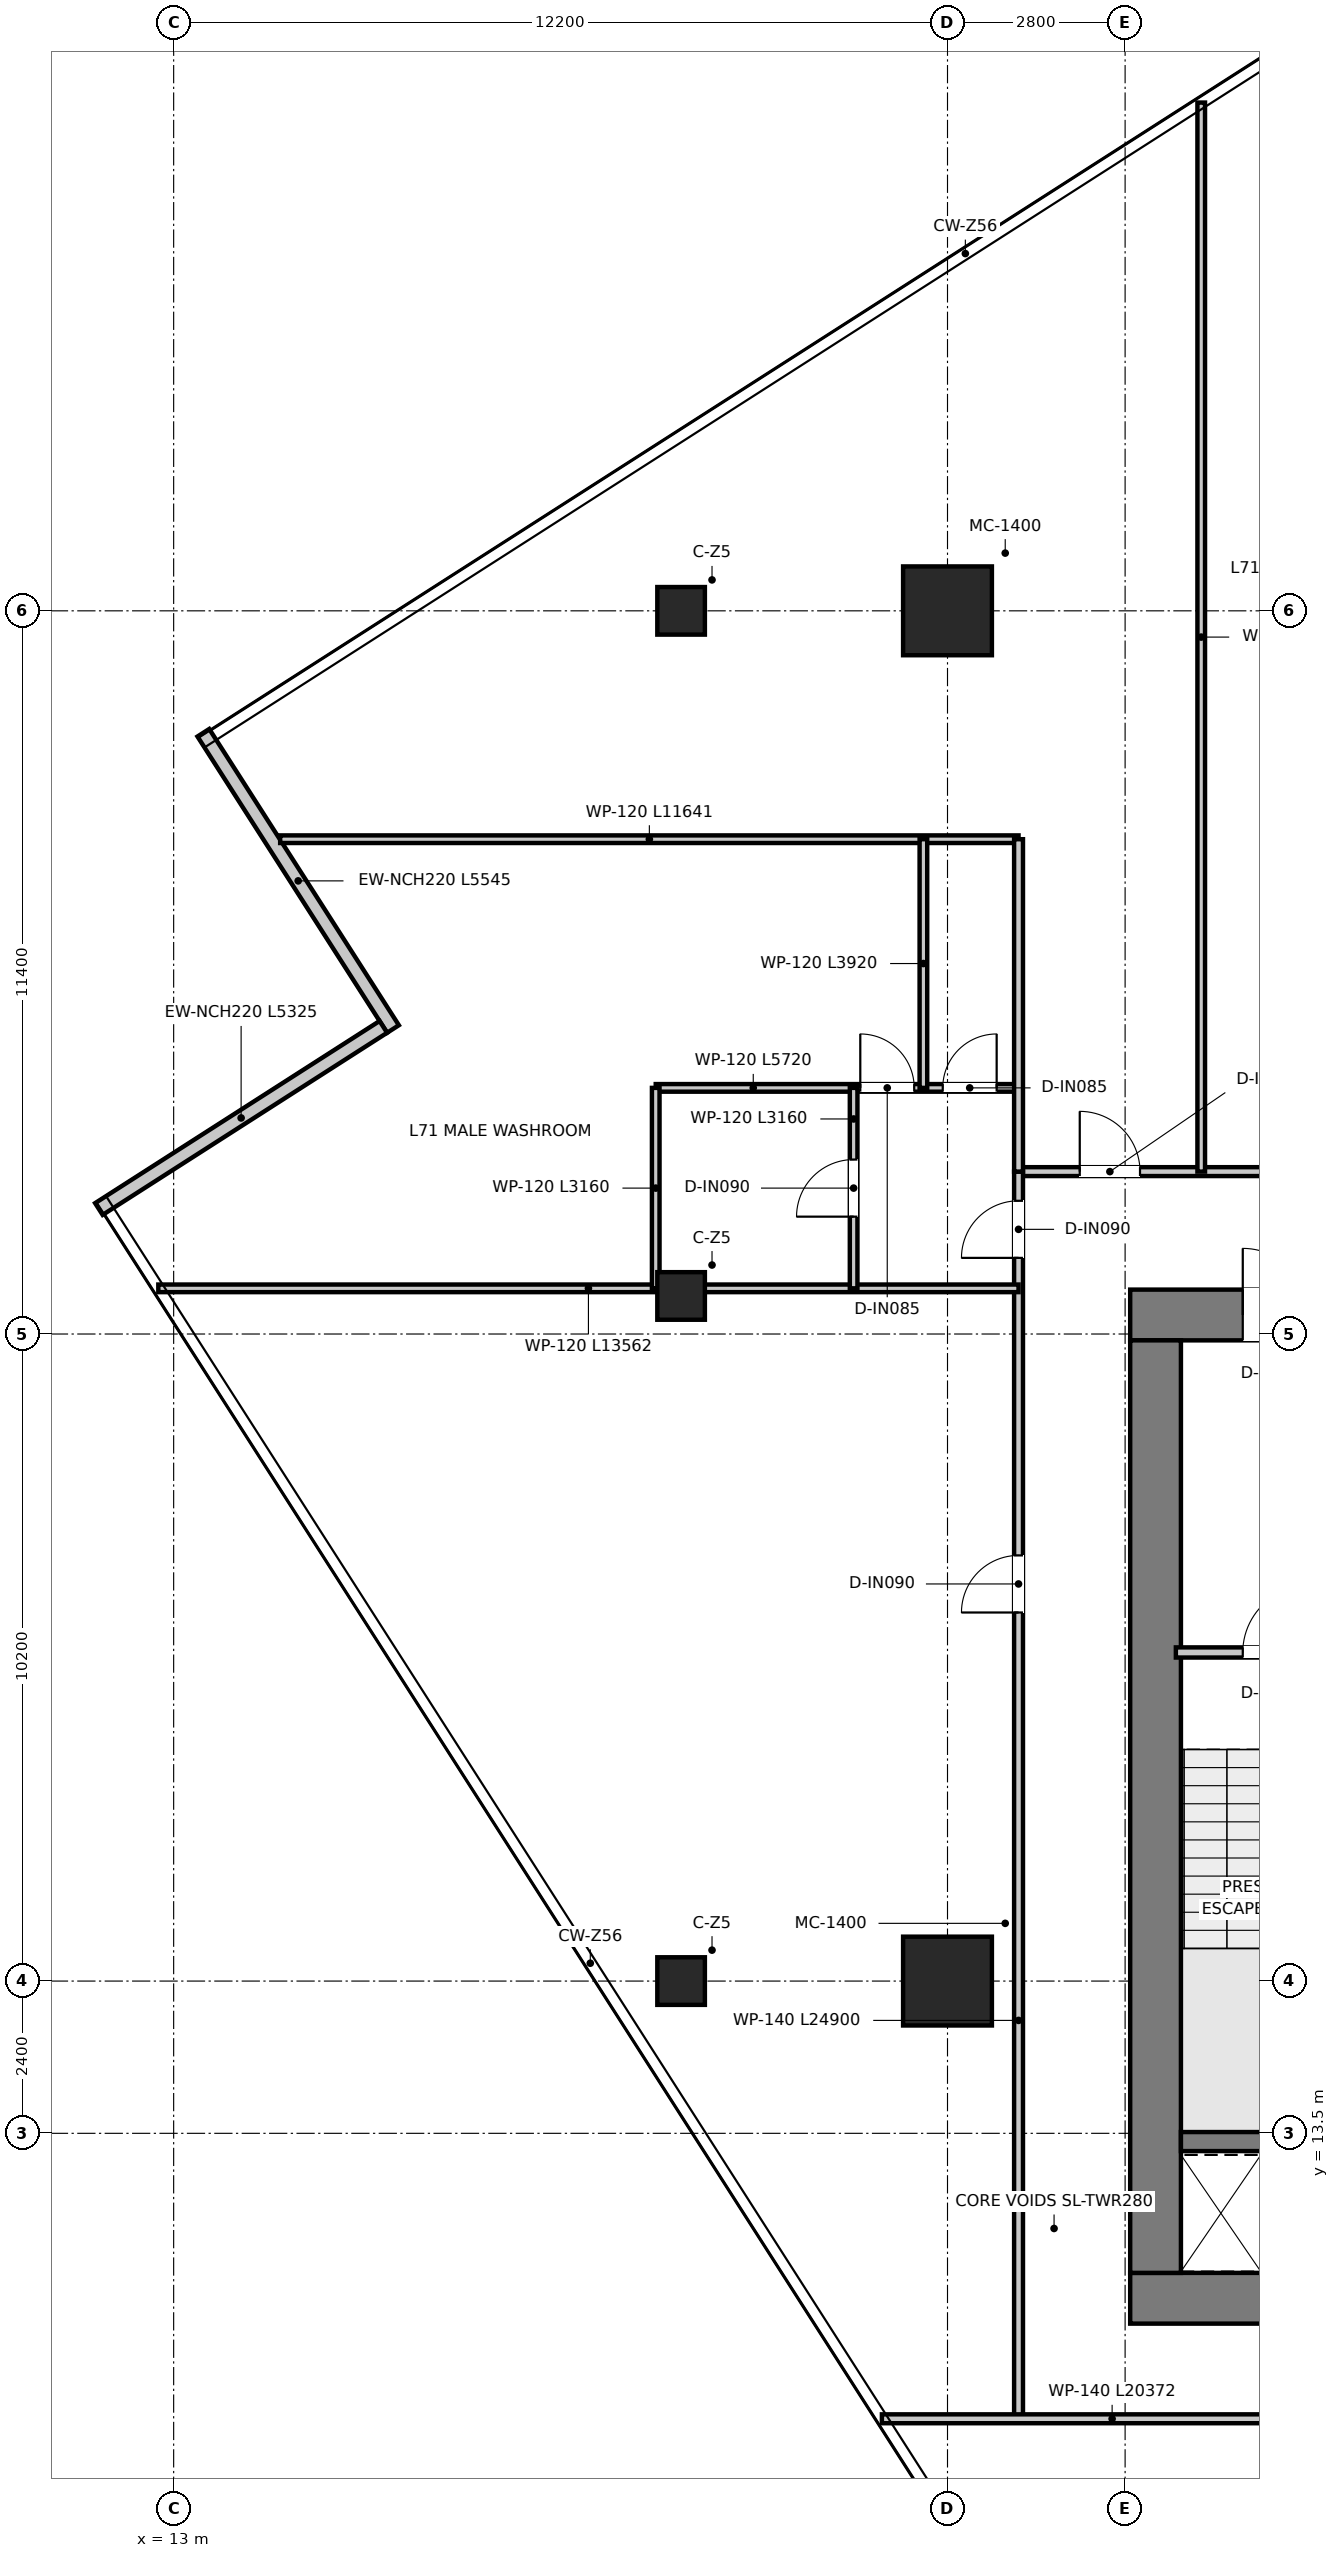
"""IFC4 building model, lengths in metres.
Left out: names, types, materials, properties, quantities, classifications, styles, units other than length and angle.
Written with IfcOpenShell. Run it as: python <this file> out.ifc"""

import sys

from ifc_helpers import new_model, si_unit, direction, frame, frame_2d, origin, origin_2d, place, context, subcontext, project, spatial, rectangle, extrude, source, transform, mapped, element, fill, save


model = new_model("IFC4")
c1 = context("Model", 3, precision=1e-05, world=origin(), true_north=direction((0.0, 1.0)))
c2 = subcontext(c1, "Body", "Model", "MODEL_VIEW")
j1 = project(units=[si_unit("LENGTHUNIT", "METRE"), si_unit("PLANEANGLEUNIT", "RADIAN")], contexts=[c1])
p1 = place(None, origin())
s1 = spatial("IfcSite", under=j1, at=p1, CompositionType="ELEMENT")
p2 = place(p1, origin())
s2 = spatial("IfcBuilding", under=s1, at=p2, CompositionType="ELEMENT")
p3 = place(p2, frame((0.0, 0.0, 291.1)))
s3 = spatial("IfcBuildingStorey", under=s2, at=p3, CompositionType="ELEMENT", Elevation=291.1)
p4 = place(p3, frame((28.08, 10.9, 0.0), z_axis=(0.0, 0.0, 1.0), x_axis=(1.0, 0.0, 0.0)))
e1 = element("IfcWall", 1, at=p4, inside=s3, PredefinedType="SHEAR", context=c2, shape_type="SweptSolid", body=[
    extrude(rectangle(XDim=15.84, YDim=0.8, at=frame_2d((7.92, 0.0))), origin(), (0.0, 0.0, 1.0), 3.95),
])
p5 = place(p3, frame((28.08, 26.4, 0.0), z_axis=(0.0, 0.0, 1.0), x_axis=(1.0, 0.0, 0.0)))
e2 = element("IfcWall", 2, at=p5, inside=s3, PredefinedType="SHEAR", context=c2, shape_type="SweptSolid", body=[
    extrude(rectangle(XDim=15.84, YDim=0.8, at=frame_2d((7.92, 0.0))), origin(), (0.0, 0.0, 1.0), 3.95),
])
p6 = place(p5, frame((7.22, 0.0, 0.0)))
e3 = element("IfcOpeningElement", 3, at=p6, cuts=e2, PredefinedType="OPENING", context=c2, shape_type="SweptSolid", body=[
    extrude(rectangle(XDim=1.4, YDim=2.2, at=frame_2d((0.7, 1.1))), frame((0.0, 0.41, 0.0), z_axis=(0.0, -1.0, 0.0), x_axis=(1.0, 0.0, 0.0)), (0.0, 0.0, 1.0), 0.82),
])
p7 = place(p5, frame((1.775, 0.0, 0.0)))
e4 = element("IfcOpeningElement", 4, at=p7, cuts=e2, PredefinedType="OPENING", context=c2, shape_type="SweptSolid", body=[
    extrude(rectangle(XDim=1.05, YDim=2.1, at=frame_2d((0.525, 1.05))), frame((0.0, 0.41, 0.0), z_axis=(0.0, -1.0, 0.0), x_axis=(1.0, 0.0, 0.0)), (0.0, 0.0, 1.0), 0.82),
])
p8 = place(p5, frame((13.015, 0.0, 0.0)))
e5 = element("IfcOpeningElement", 5, at=p8, cuts=e2, PredefinedType="OPENING", context=c2, shape_type="SweptSolid", body=[
    extrude(rectangle(XDim=1.05, YDim=2.1, at=frame_2d((0.525, 1.05))), frame((0.0, 0.41, 0.0), z_axis=(0.0, -1.0, 0.0), x_axis=(1.0, 0.0, 0.0)), (0.0, 0.0, 1.0), 0.82),
])
p9 = place(p3, frame((28.48, 11.3, 0.0), z_axis=(0.0, 0.0, 1.0), x_axis=(0.0, 1.0, 0.0)))
e6 = element("IfcWall", 6, at=p9, inside=s3, PredefinedType="SHEAR", context=c2, shape_type="SweptSolid", body=[
    extrude(rectangle(XDim=14.7, YDim=0.8, at=frame_2d((7.35, 0.0))), origin(), (0.0, 0.0, 1.0), 3.95),
])
p10 = place(p3, frame((28.88, 13.37, 0.0), z_axis=(0.0, 0.0, 1.0), x_axis=(1.0, 0.0, 0.0)))
e7 = element("IfcWall", 7, at=p10, inside=s3, PredefinedType="SHEAR", context=c2, shape_type="SweptSolid", body=[
    extrude(rectangle(XDim=3.1, YDim=0.3, at=frame_2d((1.55, 0.0))), origin(), (0.0, 0.0, 1.0), 3.95),
])
m1 = source(origin(), c2, "Body", "SweptSolid", [
    extrude(rectangle(XDim=1.4, YDim=1.4, at=origin_2d()), origin(), (0.0, 0.0, 1.0), 3.95),
])
for number, where, z_axis, x_axis in (
    (8, (25.2, 15.9, 0.0), (0.0, 0.0, 1.0), (1.0, 0.0, 0.0)),
    (9, (25.2, 37.5, 0.0), (0.0, 0.0, 1.0), (1.0, 0.0, 0.0)),
):
    element("IfcColumn", number, at=place(p3, frame(where, z_axis=z_axis, x_axis=x_axis)), inside=s3, PredefinedType="USERDEFINED", context=c2, shape_type="MappedRepresentation", body=[
        mapped(m1, transform((0.0, 0.0, 0.0), x_axis=(1.0, 0.0, 0.0), y_axis=(0.0, 1.0, 0.0), z_axis=(0.0, 0.0, 1.0), scale=1.0)),
    ])
m2 = source(origin(), c2, "Body", "SweptSolid", [
    extrude(rectangle(XDim=0.75, YDim=0.75, at=origin_2d()), origin(), (0.0, 0.0, 1.0), 3.95),
])
for number, where, z_axis, x_axis in (
    (10, (21.0, 15.9, 0.0), (0.0, 0.0, 1.0), (1.0, 0.0, 0.0)),
    (11, (21.0, 26.7, 0.0), (0.0, 0.0, 1.0), (1.0, 0.0, 0.0)),
    (12, (21.0, 37.5, 0.0), (0.0, 0.0, 1.0), (1.0, 0.0, 0.0)),
):
    element("IfcColumn", number, at=place(p3, frame(where, z_axis=z_axis, x_axis=x_axis)), inside=s3, PredefinedType="COLUMN", context=c2, shape_type="MappedRepresentation", body=[
        mapped(m2, transform((0.0, 0.0, 0.0), x_axis=(1.0, 0.0, 0.0), y_axis=(0.0, 1.0, 0.0), z_axis=(0.0, 0.0, 1.0), scale=1.0)),
    ])
p11 = place(p3, frame((13.468, 35.578, 0.0), z_axis=(0.0, 0.0, 1.0), x_axis=(0.539129907131, -0.842222620948, 0.0)))
e13 = element("IfcWall", 13, at=p11, inside=s3, PredefinedType="ELEMENTEDWALL", context=c2, shape_type="SweptSolid", body=[
    extrude(rectangle(XDim=5.545, YDim=0.22, at=frame_2d((2.772, 0.0))), origin(), (0.0, 0.0, 1.0), 3.67),
])
p12 = place(p3, frame((16.306, 30.941, 0.0), z_axis=(0.0, 0.0, 1.0), x_axis=(-0.84222560178, -0.539125250481, 0.0)))
e14 = element("IfcWall", 14, at=p12, inside=s3, PredefinedType="ELEMENTEDWALL", context=c2, shape_type="SweptSolid", body=[
    extrude(rectangle(XDim=5.325, YDim=0.22, at=frame_2d((2.663, 0.0))), origin(), (0.0, 0.0, 1.0), 3.67),
])
p13 = place(p3, frame((28.8, 21.08, 0.0), z_axis=(0.0, 0.0, 1.0), x_axis=(1.0, 0.0, 0.0)))
e15 = element("IfcWall", 15, at=p13, inside=s3, PredefinedType="PARTITIONING", context=c2, shape_type="SweptSolid", body=[
    extrude(rectangle(XDim=3.16, YDim=0.16, at=frame_2d((1.58, 0.0))), origin(), (0.0, 0.0, 1.0), 3.67),
])
p14 = place(p13, frame((1.055, 0.0, 0.0)))
e16 = element("IfcOpeningElement", 16, at=p14, cuts=e15, PredefinedType="OPENING", context=c2, shape_type="SweptSolid", body=[
    extrude(rectangle(XDim=1.05, YDim=2.1, at=frame_2d((0.525, 1.05))), frame((0.0, 0.09, 0.0), z_axis=(0.0, -1.0, 0.0), x_axis=(1.0, 0.0, 0.0)), (0.0, 0.0, 1.0), 0.18),
])
p15 = place(p3, frame((26.32, 28.66, 0.0), z_axis=(0.0, 0.0, 1.0), x_axis=(1.0, 0.0, 0.0)))
e17 = element("IfcWall", 17, at=p15, inside=s3, PredefinedType="PARTITIONING", context=c2, shape_type="SweptSolid", body=[
    extrude(rectangle(XDim=19.36, YDim=0.14, at=frame_2d((9.68, 0.0))), origin(), (0.0, 0.0, 1.0), 3.18),
])
p16 = place(p15, frame((0.965, 0.0, 0.0)))
e18 = element("IfcOpeningElement", 18, at=p16, cuts=e17, PredefinedType="OPENING", context=c2, shape_type="SweptSolid", body=[
    extrude(rectangle(XDim=0.95, YDim=2.1, at=frame_2d((0.475, 1.05))), frame((0.0, 0.08, 0.0), z_axis=(0.0, -1.0, 0.0), x_axis=(1.0, 0.0, 0.0)), (0.0, 0.0, 1.0), 0.16),
])
p17 = place(p15, frame((4.705, 0.0, 0.0)))
e19 = element("IfcOpeningElement", 19, at=p17, cuts=e17, PredefinedType="OPENING", context=c2, shape_type="SweptSolid", body=[
    extrude(rectangle(XDim=0.95, YDim=2.1, at=frame_2d((0.475, 1.05))), frame((0.0, 0.08, 0.0), z_axis=(0.0, -1.0, 0.0), x_axis=(1.0, 0.0, 0.0)), (0.0, 0.0, 1.0), 0.16),
])
p18 = place(p15, frame((9.305, 0.0, 0.0)))
e20 = element("IfcOpeningElement", 20, at=p18, cuts=e17, PredefinedType="OPENING", context=c2, shape_type="SweptSolid", body=[
    extrude(rectangle(XDim=0.95, YDim=2.1, at=frame_2d((0.475, 1.05))), frame((0.0, 0.08, 0.0), z_axis=(0.0, -1.0, 0.0), x_axis=(1.0, 0.0, 0.0)), (0.0, 0.0, 1.0), 0.16),
])
p19 = place(p15, frame((13.805, 0.0, 0.0)))
e21 = element("IfcOpeningElement", 21, at=p19, cuts=e17, PredefinedType="OPENING", context=c2, shape_type="SweptSolid", body=[
    extrude(rectangle(XDim=0.95, YDim=2.1, at=frame_2d((0.475, 1.05))), frame((0.0, 0.08, 0.0), z_axis=(0.0, -1.0, 0.0), x_axis=(1.0, 0.0, 0.0)), (0.0, 0.0, 1.0), 0.16),
])
p20 = place(p15, frame((17.445, 0.0, 0.0)))
e22 = element("IfcOpeningElement", 22, at=p20, cuts=e17, PredefinedType="OPENING", context=c2, shape_type="SweptSolid", body=[
    extrude(rectangle(XDim=0.95, YDim=2.1, at=frame_2d((0.475, 1.05))), frame((0.0, 0.08, 0.0), z_axis=(0.0, -1.0, 0.0), x_axis=(1.0, 0.0, 0.0)), (0.0, 0.0, 1.0), 0.16),
])
p21 = place(p3, frame((26.32, 9.0, 0.0), z_axis=(0.0, 0.0, 1.0), x_axis=(0.0, 1.0, 0.0)))
e23 = element("IfcWall", 23, at=p21, inside=s3, PredefinedType="PARTITIONING", context=c2, shape_type="SweptSolid", body=[
    extrude(rectangle(XDim=19.66, YDim=0.14, at=frame_2d((9.83, 0.0))), origin(), (0.0, 0.0, 1.0), 3.13),
])
p22 = place(p21, frame((18.3, 0.0, 0.0)))
e24 = element("IfcOpeningElement", 24, at=p22, cuts=e23, PredefinedType="OPENING", context=c2, shape_type="SweptSolid", body=[
    extrude(rectangle(XDim=0.9, YDim=2.1, at=frame_2d((0.45, 1.05))), frame((0.0, 0.08, 0.0), z_axis=(0.0, -1.0, 0.0), x_axis=(1.0, 0.0, 0.0)), (0.0, 0.0, 1.0), 0.16),
])
p23 = place(p21, frame((12.71, 0.0, 0.0)))
e25 = element("IfcOpeningElement", 25, at=p23, cuts=e23, PredefinedType="OPENING", context=c2, shape_type="SweptSolid", body=[
    extrude(rectangle(XDim=0.9, YDim=2.1, at=frame_2d((0.45, 1.05))), frame((0.0, 0.08, 0.0), z_axis=(0.0, -1.0, 0.0), x_axis=(1.0, 0.0, 0.0)), (0.0, 0.0, 1.0), 0.16),
])
p24 = place(p3, frame((24.166, 9.0, 0.0), z_axis=(0.0, 0.0, 1.0), x_axis=(1.0, 0.0, 0.0)))
e26 = element("IfcWall", 26, at=p24, inside=s3, PredefinedType="PARTITIONING", context=c2, shape_type="SweptSolid", body=[
    extrude(rectangle(XDim=20.372, YDim=0.14, at=frame_2d((10.186, 0.0))), origin(), (0.0, 0.0, 1.0), 3.67),
])
p25 = place(p24, frame((7.409, 0.0, 0.0)))
e27 = element("IfcOpeningElement", 27, at=p25, cuts=e26, PredefinedType="OPENING", context=c2, shape_type="SweptSolid", body=[
    extrude(rectangle(XDim=0.85, YDim=2.1, at=frame_2d((0.425, 1.05))), frame((0.0, 0.08, 0.0), z_axis=(0.0, -1.0, 0.0), x_axis=(1.0, 0.0, 0.0)), (0.0, 0.0, 1.0), 0.16),
])
p26 = place(p24, frame((15.409, 0.0, 0.0)))
e28 = element("IfcOpeningElement", 28, at=p26, cuts=e26, PredefinedType="OPENING", context=c2, shape_type="SweptSolid", body=[
    extrude(rectangle(XDim=0.85, YDim=2.1, at=frame_2d((0.425, 1.05))), frame((0.0, 0.08, 0.0), z_axis=(0.0, -1.0, 0.0), x_axis=(1.0, 0.0, 0.0)), (0.0, 0.0, 1.0), 0.16),
])
p27 = place(p3, frame((12.758, 26.82, 0.0), z_axis=(0.0, 0.0, 1.0), x_axis=(1.0, 0.0, 0.0)))
e29 = element("IfcWall", 29, at=p27, inside=s3, PredefinedType="PARTITIONING", context=c2, shape_type="SweptSolid", body=[
    extrude(rectangle(XDim=13.562, YDim=0.12, at=frame_2d((6.781, 0.0))), origin(), (0.0, 0.0, 1.0), 3.13),
])
p28 = place(p3, frame((14.679, 33.9, 0.0), z_axis=(0.0, 0.0, 1.0), x_axis=(1.0, 0.0, 0.0)))
e30 = element("IfcWall", 30, at=p28, inside=s3, PredefinedType="PARTITIONING", context=c2, shape_type="SweptSolid", body=[
    extrude(rectangle(XDim=11.641, YDim=0.12, at=frame_2d((5.82, 0.0))), origin(), (0.0, 0.0, 1.0), 3.13),
])
p29 = place(p3, frame((20.6, 29.98, 0.0), z_axis=(0.0, 0.0, 1.0), x_axis=(1.0, 0.0, 0.0)))
e31 = element("IfcWall", 31, at=p29, inside=s3, PredefinedType="PARTITIONING", context=c2, shape_type="SweptSolid", body=[
    extrude(rectangle(XDim=5.72, YDim=0.12, at=frame_2d((2.86, 0.0))), origin(), (0.0, 0.0, 1.0), 3.13),
])
p30 = place(p29, frame((3.225, 0.0, 0.0)))
e32 = element("IfcOpeningElement", 32, at=p30, cuts=e31, PredefinedType="OPENING", context=c2, shape_type="SweptSolid", body=[
    extrude(rectangle(XDim=0.85, YDim=2.1, at=frame_2d((0.425, 1.05))), frame((0.0, 0.07, 0.0), z_axis=(0.0, -1.0, 0.0), x_axis=(1.0, 0.0, 0.0)), (0.0, 0.0, 1.0), 0.14),
])
p31 = place(p29, frame((4.525, 0.0, 0.0)))
e33 = element("IfcOpeningElement", 33, at=p31, cuts=e31, PredefinedType="OPENING", context=c2, shape_type="SweptSolid", body=[
    extrude(rectangle(XDim=0.85, YDim=2.1, at=frame_2d((0.425, 1.05))), frame((0.0, 0.07, 0.0), z_axis=(0.0, -1.0, 0.0), x_axis=(1.0, 0.0, 0.0)), (0.0, 0.0, 1.0), 0.14),
])
p32 = place(p3, frame((20.6, 26.82, 0.0), z_axis=(0.0, 0.0, 1.0), x_axis=(0.0, 1.0, 0.0)))
e34 = element("IfcWall", 34, at=p32, inside=s3, PredefinedType="PARTITIONING", context=c2, shape_type="SweptSolid", body=[
    extrude(rectangle(XDim=3.16, YDim=0.12, at=frame_2d((1.58, 0.0))), origin(), (0.0, 0.0, 1.0), 3.67),
])
p33 = place(p3, frame((23.72, 26.82, 0.0), z_axis=(0.0, 0.0, 1.0), x_axis=(0.0, 1.0, 0.0)))
e35 = element("IfcWall", 35, at=p33, inside=s3, PredefinedType="PARTITIONING", context=c2, shape_type="SweptSolid", body=[
    extrude(rectangle(XDim=3.16, YDim=0.12, at=frame_2d((1.58, 0.0))), origin(), (0.0, 0.0, 1.0), 3.18),
])
p34 = place(p33, frame((1.13, 0.0, 0.0)))
e36 = element("IfcOpeningElement", 36, at=p34, cuts=e35, PredefinedType="OPENING", context=c2, shape_type="SweptSolid", body=[
    extrude(rectangle(XDim=0.9, YDim=2.1, at=frame_2d((0.45, 1.05))), frame((0.0, 0.07, 0.0), z_axis=(0.0, -1.0, 0.0), x_axis=(1.0, 0.0, 0.0)), (0.0, 0.0, 1.0), 0.14),
])
p35 = place(p3, frame((24.82, 29.98, 0.0), z_axis=(0.0, 0.0, 1.0), x_axis=(0.0, 1.0, 0.0)))
e37 = element("IfcWall", 37, at=p35, inside=s3, PredefinedType="PARTITIONING", context=c2, shape_type="SweptSolid", body=[
    extrude(rectangle(XDim=3.92, YDim=0.12, at=frame_2d((1.96, 0.0))), origin(), (0.0, 0.0, 1.0), 3.31),
])
p36 = place(p3, frame((26.32, 28.66, 0.0), z_axis=(0.0, 0.0, 1.0), x_axis=(0.0, 1.0, 0.0)))
e38 = element("IfcWall", 38, at=p36, inside=s3, PredefinedType="PARTITIONING", context=c2, shape_type="SweptSolid", body=[
    extrude(rectangle(XDim=5.24, YDim=0.14, at=frame_2d((2.62, 0.0))), origin(), (0.0, 0.0, 1.0), 3.43),
])
p37 = place(p3, frame((29.2, 28.66, 0.0), z_axis=(0.0, 0.0, 1.0), x_axis=(0.0, 1.0, 0.0)))
e39 = element("IfcWall", 39, at=p37, inside=s3, PredefinedType="PARTITIONING", context=c2, shape_type="SweptSolid", body=[
    extrude(rectangle(XDim=16.852, YDim=0.12, at=frame_2d((8.426, 0.0))), origin(), (0.0, 0.0, 1.0), 3.13),
])
p38 = place(p14, origin())
e40 = element("IfcDoor", 40, at=p38, inside=s3, OperationType="SINGLE_SWING_RIGHT", PredefinedType="DOOR", context=c2, shape_type="SweptSolid", body=[
    extrude(rectangle(XDim=1.05, YDim=2.1, at=frame_2d((0.525, 1.05))), frame((0.0, 0.025, 0.0), z_axis=(0.0, -1.0, 0.0), x_axis=(1.0, 0.0, 0.0)), (0.0, 0.0, 1.0), 0.05),
])
fill(e16, e40)
p39 = place(p7, origin())
e41 = element("IfcDoor", 41, at=p39, inside=s3, OperationType="SINGLE_SWING_LEFT", PredefinedType="DOOR", context=c2, shape_type="SweptSolid", body=[
    extrude(rectangle(XDim=1.05, YDim=2.1, at=frame_2d((0.525, 1.05))), frame((0.0, 0.025, 0.0), z_axis=(0.0, -1.0, 0.0), x_axis=(1.0, 0.0, 0.0)), (0.0, 0.0, 1.0), 0.05),
])
fill(e4, e41)
p40 = place(p22, origin())
e42 = element("IfcDoor", 42, at=p40, inside=s3, OperationType="SINGLE_SWING_LEFT", PredefinedType="DOOR", context=c2, shape_type="SweptSolid", body=[
    extrude(rectangle(XDim=0.9, YDim=2.1, at=frame_2d((0.45, 1.05))), frame((0.0, 0.025, 0.0), z_axis=(0.0, -1.0, 0.0), x_axis=(1.0, 0.0, 0.0)), (0.0, 0.0, 1.0), 0.05),
])
fill(e24, e42)
p41 = place(p30, origin())
e43 = element("IfcDoor", 43, at=p41, inside=s3, OperationType="SINGLE_SWING_LEFT", PredefinedType="DOOR", context=c2, shape_type="SweptSolid", body=[
    extrude(rectangle(XDim=0.85, YDim=2.1, at=frame_2d((0.425, 1.05))), frame((0.0, 0.025, 0.0), z_axis=(0.0, -1.0, 0.0), x_axis=(1.0, 0.0, 0.0)), (0.0, 0.0, 1.0), 0.05),
])
fill(e32, e43)
p42 = place(p31, origin())
e44 = element("IfcDoor", 44, at=p42, inside=s3, OperationType="SINGLE_SWING_RIGHT", PredefinedType="DOOR", context=c2, shape_type="SweptSolid", body=[
    extrude(rectangle(XDim=0.85, YDim=2.1, at=frame_2d((0.425, 1.05))), frame((0.0, 0.025, 0.0), z_axis=(0.0, -1.0, 0.0), x_axis=(1.0, 0.0, 0.0)), (0.0, 0.0, 1.0), 0.05),
])
fill(e33, e44)
p43 = place(p34, origin())
e45 = element("IfcDoor", 45, at=p43, inside=s3, OperationType="SINGLE_SWING_LEFT", PredefinedType="DOOR", context=c2, shape_type="SweptSolid", body=[
    extrude(rectangle(XDim=0.9, YDim=2.1, at=frame_2d((0.45, 1.05))), frame((0.0, 0.025, 0.0), z_axis=(0.0, -1.0, 0.0), x_axis=(1.0, 0.0, 0.0)), (0.0, 0.0, 1.0), 0.05),
])
fill(e36, e45)
p44 = place(p16, origin())
e46 = element("IfcDoor", 46, at=p44, inside=s3, OperationType="SINGLE_SWING_LEFT", PredefinedType="DOOR", context=c2, shape_type="SweptSolid", body=[
    extrude(rectangle(XDim=0.95, YDim=2.1, at=frame_2d((0.475, 1.05))), frame((0.0, 0.025, 0.0), z_axis=(0.0, -1.0, 0.0), x_axis=(1.0, 0.0, 0.0)), (0.0, 0.0, 1.0), 0.05),
])
fill(e18, e46)
p45 = place(p23, origin())
e47 = element("IfcDoor", 47, at=p45, inside=s3, OperationType="SINGLE_SWING_LEFT", PredefinedType="DOOR", context=c2, shape_type="SweptSolid", body=[
    extrude(rectangle(XDim=0.9, YDim=2.1, at=frame_2d((0.45, 1.05))), frame((0.0, 0.025, 0.0), z_axis=(0.0, -1.0, 0.0), x_axis=(1.0, 0.0, 0.0)), (0.0, 0.0, 1.0), 0.05),
])
fill(e25, e47)
save(model, sys.argv[1])
